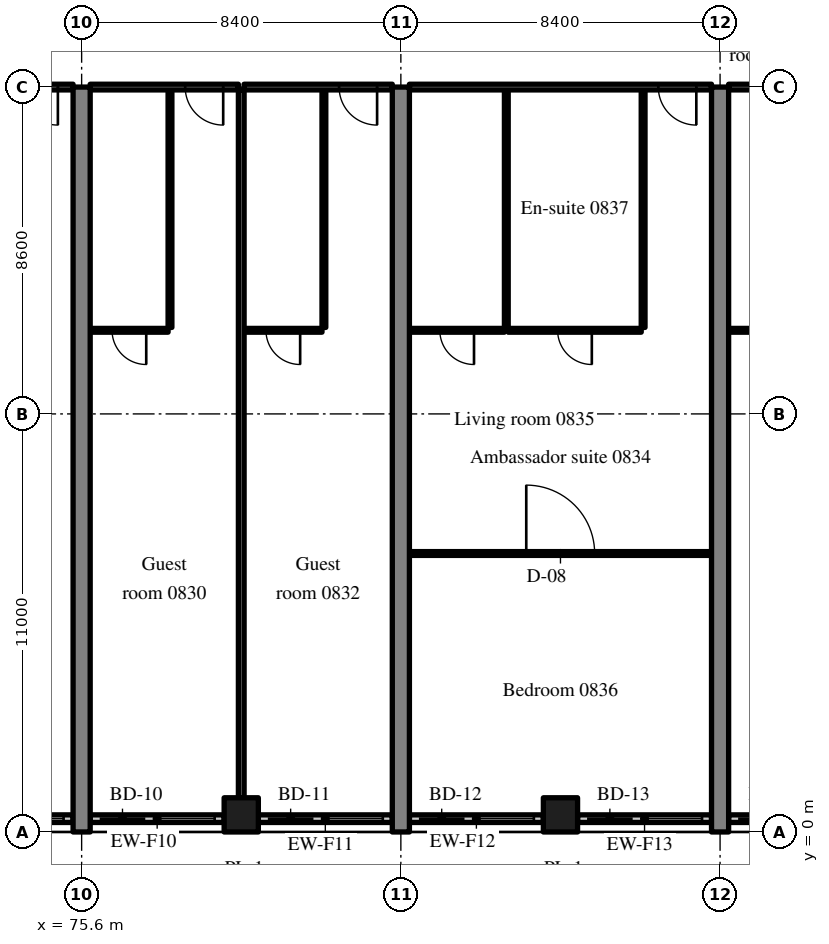
"""IFC4 building model, lengths in metres.
Left out: names, types, materials, properties, quantities, classifications, styles, units other than length and angle.
Written with IfcOpenShell. Run it as: python <this file> out.ifc"""

import sys

from ifc_helpers import new_model, si_unit, direction, frame, frame_2d, origin, origin_2d, place, context, subcontext, project, spatial, rectangle, extrude, source, transform, mapped, element, fill, save


model = new_model("IFC4")
c1 = context("Model", 3, precision=1e-05, world=origin(), true_north=direction((0.0, 1.0)))
c2 = subcontext(c1, "Body", "Model", "MODEL_VIEW")
j1 = project(units=[si_unit("LENGTHUNIT", "METRE"), si_unit("PLANEANGLEUNIT", "RADIAN")], contexts=[c1])
p1 = place(None, origin())
s1 = spatial("IfcSite", under=j1, at=p1, CompositionType="ELEMENT")
p2 = place(p1, origin())
s2 = spatial("IfcBuilding", under=s1, at=p2, CompositionType="ELEMENT")
p3 = place(p2, frame((0.0, 0.0, 39.2)))
s3 = spatial("IfcBuildingStorey", under=s2, at=p3, CompositionType="ELEMENT", Elevation=39.2)
m1 = source(origin(), c2, "Body", "SweptSolid", [
    extrude(rectangle(XDim=19.6, YDim=0.45, at=frame_2d((9.8, 0.0))), origin(), (0.0, 0.0, 1.0), 3.52),
])
for number, where, z_axis, x_axis in (
    (1, (75.6, 0.0, 0.0), (0.0, 0.0, 1.0), (0.0, 1.0, 0.0)),
    (2, (84.0, 0.0, 0.0), (0.0, 0.0, 1.0), (0.0, 1.0, 0.0)),
    (3, (92.4, 0.0, 0.0), (0.0, 0.0, 1.0), (0.0, 1.0, 0.0)),
):
    element("IfcWall", number, at=place(p3, frame(where, z_axis=z_axis, x_axis=x_axis)), inside=s3, PredefinedType="SHEAR", context=c2, shape_type="MappedRepresentation", body=[
        mapped(m1, transform((0.0, 0.0, 0.0), scale=1.0)),
    ])
m2 = source(origin(), c2, "Body", "SweptSolid", [
    extrude(rectangle(XDim=0.9, YDim=0.9, at=origin_2d()), origin(), (0.0, 0.0, 1.0), 3.52),
])
for number, where, z_axis, x_axis in (
    (4, (79.8, 0.45, 0.0), (0.0, 0.0, 1.0), (1.0, 0.0, 0.0)),
    (5, (88.2, 0.45, 0.0), (0.0, 0.0, 1.0), (1.0, 0.0, 0.0)),
):
    element("IfcColumn", number, at=place(p3, frame(where, z_axis=z_axis, x_axis=x_axis)), inside=s3, PredefinedType="COLUMN", context=c2, shape_type="MappedRepresentation", body=[
        mapped(m2, transform((0.0, 0.0, 0.0), scale=1.0)),
    ])
m3 = source(origin(), c2, "Body", "SweptSolid", [
    extrude(rectangle(XDim=3.525, YDim=0.2, at=frame_2d((1.762, 0.0))), origin(), (0.0, 0.0, 1.0), 2.77),
])
p4 = place(p3, frame((71.85, 0.35, 0.0), z_axis=(0.0, 0.0, 1.0), x_axis=(1.0, 0.0, 0.0)))
e6 = element("IfcWall", 6, at=p4, inside=s3, PredefinedType="SOLIDWALL", context=c2, shape_type="MappedRepresentation", body=[
    mapped(m3, transform((0.0, 0.0, 0.0), scale=1.0)),
])
m4 = source(origin(), c2, "Body", "SweptSolid", [
    extrude(rectangle(XDim=1.2, YDim=2.4, at=frame_2d((0.6, 1.2))), frame((0.0, 0.11, 0.0), z_axis=(0.0, -1.0, 0.0), x_axis=(1.0, 0.0, 0.0)), (0.0, 0.0, 1.0), 0.22),
])
p5 = place(p4, frame((0.25, 0.0, 0.0)))
e7 = element("IfcOpeningElement", 7, at=p5, cuts=e6, PredefinedType="OPENING", context=c2, shape_type="MappedRepresentation", body=[
    mapped(m4, transform((0.0, 0.0, 0.0), scale=1.0)),
])
m5 = source(origin(), c2, "Body", "SweptSolid", [
    extrude(rectangle(XDim=1.5, YDim=1.5, at=frame_2d((0.75, 0.75))), frame((0.0, 0.11, 0.0), z_axis=(0.0, -1.0, 0.0), x_axis=(1.0, 0.0, 0.0)), (0.0, 0.0, 1.0), 0.22),
])
p6 = place(p4, frame((1.775, 0.0, 0.9)))
e8 = element("IfcOpeningElement", 8, at=p6, cuts=e6, PredefinedType="OPENING", context=c2, shape_type="MappedRepresentation", body=[
    mapped(m5, transform((0.0, 0.0, 0.0), scale=1.0)),
])
m6 = source(origin(), c2, "Body", "SweptSolid", [
    extrude(rectangle(XDim=3.525, YDim=0.2, at=frame_2d((1.763, 0.0))), origin(), (0.0, 0.0, 1.0), 2.77),
])
p7 = place(p3, frame((75.825, 0.35, 0.0), z_axis=(0.0, 0.0, 1.0), x_axis=(1.0, 0.0, 0.0)))
e9 = element("IfcWall", 9, at=p7, inside=s3, PredefinedType="SOLIDWALL", context=c2, shape_type="MappedRepresentation", body=[
    mapped(m6, transform((0.0, 0.0, 0.0), scale=1.0)),
])
p8 = place(p7, frame((0.25, 0.0, 0.0)))
e10 = element("IfcOpeningElement", 10, at=p8, cuts=e9, PredefinedType="OPENING", context=c2, shape_type="MappedRepresentation", body=[
    mapped(m4, transform((0.0, 0.0, 0.0), scale=1.0)),
])
p9 = place(p7, frame((1.775, 0.0, 0.9)))
e11 = element("IfcOpeningElement", 11, at=p9, cuts=e9, PredefinedType="OPENING", context=c2, shape_type="MappedRepresentation", body=[
    mapped(m5, transform((0.0, 0.0, 0.0), scale=1.0)),
])
p10 = place(p3, frame((80.25, 0.35, 0.0), z_axis=(0.0, 0.0, 1.0), x_axis=(1.0, 0.0, 0.0)))
e12 = element("IfcWall", 12, at=p10, inside=s3, PredefinedType="SOLIDWALL", context=c2, shape_type="MappedRepresentation", body=[
    mapped(m3, transform((0.0, 0.0, 0.0), scale=1.0)),
])
p11 = place(p10, frame((0.25, 0.0, 0.0)))
e13 = element("IfcOpeningElement", 13, at=p11, cuts=e12, PredefinedType="OPENING", context=c2, shape_type="MappedRepresentation", body=[
    mapped(m4, transform((0.0, 0.0, 0.0), scale=1.0)),
])
p12 = place(p10, frame((1.775, 0.0, 0.9)))
e14 = element("IfcOpeningElement", 14, at=p12, cuts=e12, PredefinedType="OPENING", context=c2, shape_type="MappedRepresentation", body=[
    mapped(m5, transform((0.0, 0.0, 0.0), scale=1.0)),
])
p13 = place(p3, frame((84.225, 0.35, 0.0), z_axis=(0.0, 0.0, 1.0), x_axis=(1.0, 0.0, 0.0)))
e15 = element("IfcWall", 15, at=p13, inside=s3, PredefinedType="SOLIDWALL", context=c2, shape_type="MappedRepresentation", body=[
    mapped(m3, transform((0.0, 0.0, 0.0), scale=1.0)),
])
p14 = place(p13, frame((0.25, 0.0, 0.0)))
e16 = element("IfcOpeningElement", 16, at=p14, cuts=e15, PredefinedType="OPENING", context=c2, shape_type="MappedRepresentation", body=[
    mapped(m4, transform((0.0, 0.0, 0.0), scale=1.0)),
])
p15 = place(p13, frame((1.775, 0.0, 0.9)))
e17 = element("IfcOpeningElement", 17, at=p15, cuts=e15, PredefinedType="OPENING", context=c2, shape_type="MappedRepresentation", body=[
    mapped(m5, transform((0.0, 0.0, 0.0), scale=1.0)),
])
p16 = place(p3, frame((88.65, 0.35, 0.0), z_axis=(0.0, 0.0, 1.0), x_axis=(1.0, 0.0, 0.0)))
e18 = element("IfcWall", 18, at=p16, inside=s3, PredefinedType="SOLIDWALL", context=c2, shape_type="MappedRepresentation", body=[
    mapped(m6, transform((0.0, 0.0, 0.0), scale=1.0)),
])
p17 = place(p16, frame((0.25, 0.0, 0.0)))
e19 = element("IfcOpeningElement", 19, at=p17, cuts=e18, PredefinedType="OPENING", context=c2, shape_type="MappedRepresentation", body=[
    mapped(m4, transform((0.0, 0.0, 0.0), scale=1.0)),
])
p18 = place(p16, frame((1.775, 0.0, 0.9)))
e20 = element("IfcOpeningElement", 20, at=p18, cuts=e18, PredefinedType="OPENING", context=c2, shape_type="MappedRepresentation", body=[
    mapped(m5, transform((0.0, 0.0, 0.0), scale=1.0)),
])
m7 = source(origin(), c2, "Body", "SweptSolid", [
    extrude(rectangle(XDim=4.03, YDim=0.2, at=frame_2d((2.015, 0.0))), origin(), (0.0, 0.0, 1.0), 2.77),
])
p19 = place(p3, frame((92.625, 0.35, 0.0), z_axis=(0.0, 0.0, 1.0), x_axis=(1.0, 0.0, 0.0)))
e21 = element("IfcWall", 21, at=p19, inside=s3, PredefinedType="SOLIDWALL", context=c2, shape_type="MappedRepresentation", body=[
    mapped(m7, transform((0.0, 0.0, 0.0), scale=1.0)),
])
p20 = place(p19, frame((0.25, 0.0, 0.0)))
e22 = element("IfcOpeningElement", 22, at=p20, cuts=e21, PredefinedType="OPENING", context=c2, shape_type="MappedRepresentation", body=[
    mapped(m4, transform((0.0, 0.0, 0.0), scale=1.0)),
])
p21 = place(p19, frame((2.28, 0.0, 0.9)))
e23 = element("IfcOpeningElement", 23, at=p21, cuts=e21, PredefinedType="OPENING", context=c2, shape_type="MappedRepresentation", body=[
    mapped(m5, transform((0.0, 0.0, 0.0), scale=1.0)),
])
m8 = source(origin(), c2, "Body", "SweptSolid", [
    extrude(rectangle(XDim=7.95, YDim=0.15, at=frame_2d((3.975, 0.0))), origin(), (0.0, 0.0, 1.0), 2.82),
])
p22 = place(p3, frame((67.425, 19.6, 0.0), z_axis=(0.0, 0.0, 1.0), x_axis=(1.0, 0.0, 0.0)))
e24 = element("IfcWall", 24, at=p22, inside=s3, PredefinedType="PARTITIONING", context=c2, shape_type="MappedRepresentation", body=[
    mapped(m8, transform((0.0, 0.0, 0.0), scale=1.0)),
])
m9 = source(origin(), c2, "Body", "SweptSolid", [
    extrude(rectangle(XDim=1.0, YDim=2.1, at=frame_2d((0.5, 1.05))), frame((0.0, 0.085, 0.0), z_axis=(0.0, -1.0, 0.0), x_axis=(1.0, 0.0, 0.0)), (0.0, 0.0, 1.0), 0.17),
])
p23 = place(p22, frame((6.55, 0.0, 0.0)))
e25 = element("IfcOpeningElement", 25, at=p23, cuts=e24, PredefinedType="OPENING", context=c2, shape_type="MappedRepresentation", body=[
    mapped(m9, transform((0.0, 0.0, 0.0), scale=1.0)),
])
m10 = source(origin(), c2, "Body", "SweptSolid", [
    extrude(rectangle(XDim=6.25, YDim=0.1, at=frame_2d((3.125, 0.0))), origin(), (0.0, 0.0, 1.0), 3.52),
])
p24 = place(p3, frame((77.925, 13.275, 0.0), z_axis=(0.0, 0.0, 1.0), x_axis=(0.0, 1.0, 0.0)))
e26 = element("IfcWall", 26, at=p24, inside=s3, PredefinedType="PARTITIONING", context=c2, shape_type="MappedRepresentation", body=[
    mapped(m10, transform((0.0, 0.0, 0.0), scale=1.0)),
])
m11 = source(origin(), c2, "Body", "SweptSolid", [
    extrude(rectangle(XDim=2.05, YDim=0.1, at=frame_2d((1.025, 0.0))), origin(), (0.0, 0.0, 1.0), 3.52),
])
p25 = place(p3, frame((75.825, 13.2, 0.0), z_axis=(0.0, 0.0, 1.0), x_axis=(1.0, 0.0, 0.0)))
e27 = element("IfcWall", 27, at=p25, inside=s3, PredefinedType="PARTITIONING", context=c2, shape_type="MappedRepresentation", body=[
    mapped(m11, transform((0.0, 0.0, 0.0), scale=1.0)),
])
m12 = source(origin(), c2, "Body", "SweptSolid", [
    extrude(rectangle(XDim=0.9, YDim=2.1, at=frame_2d((0.45, 1.05))), frame((0.0, 0.06, 0.0), z_axis=(0.0, -1.0, 0.0), x_axis=(1.0, 0.0, 0.0)), (0.0, 0.0, 1.0), 0.12),
])
p26 = place(p25, frame((0.575, 0.0, 0.0)))
e28 = element("IfcOpeningElement", 28, at=p26, cuts=e27, PredefinedType="OPENING", context=c2, shape_type="MappedRepresentation", body=[
    mapped(m12, transform((0.0, 0.0, 0.0), scale=1.0)),
])
m13 = source(origin(), c2, "Body", "SweptSolid", [
    extrude(rectangle(XDim=3.9, YDim=0.15, at=frame_2d((1.95, 0.0))), origin(), (0.0, 0.0, 1.0), 2.82),
])
p27 = place(p3, frame((75.825, 19.6, 0.0), z_axis=(0.0, 0.0, 1.0), x_axis=(1.0, 0.0, 0.0)))
e29 = element("IfcWall", 29, at=p27, inside=s3, PredefinedType="PARTITIONING", context=c2, shape_type="MappedRepresentation", body=[
    mapped(m13, transform((0.0, 0.0, 0.0), scale=1.0)),
])
p28 = place(p27, frame((2.5, 0.0, 0.0)))
e30 = element("IfcOpeningElement", 30, at=p28, cuts=e29, PredefinedType="OPENING", context=c2, shape_type="MappedRepresentation", body=[
    mapped(m9, transform((0.0, 0.0, 0.0), scale=1.0)),
])
p29 = place(p3, frame((81.975, 13.275, 0.0), z_axis=(0.0, 0.0, 1.0), x_axis=(0.0, 1.0, 0.0)))
e31 = element("IfcWall", 31, at=p29, inside=s3, PredefinedType="PARTITIONING", context=c2, shape_type="MappedRepresentation", body=[
    mapped(m10, transform((0.0, 0.0, 0.0), scale=1.0)),
])
p30 = place(p3, frame((79.875, 13.2, 0.0), z_axis=(0.0, 0.0, 1.0), x_axis=(1.0, 0.0, 0.0)))
e32 = element("IfcWall", 32, at=p30, inside=s3, PredefinedType="PARTITIONING", context=c2, shape_type="MappedRepresentation", body=[
    mapped(m11, transform((0.0, 0.0, 0.0), scale=1.0)),
])
p31 = place(p30, frame((0.575, 0.0, 0.0)))
e33 = element("IfcOpeningElement", 33, at=p31, cuts=e32, PredefinedType="OPENING", context=c2, shape_type="MappedRepresentation", body=[
    mapped(m12, transform((0.0, 0.0, 0.0), scale=1.0)),
])
m14 = source(origin(), c2, "Body", "SweptSolid", [
    extrude(rectangle(XDim=3.9, YDim=0.15, at=frame_2d((1.95, 0.0))), origin(), (0.0, 0.0, 1.0), 2.82),
])
p32 = place(p3, frame((79.875, 19.6, 0.0), z_axis=(0.0, 0.0, 1.0), x_axis=(1.0, 0.0, 0.0)))
e34 = element("IfcWall", 34, at=p32, inside=s3, PredefinedType="PARTITIONING", context=c2, shape_type="MappedRepresentation", body=[
    mapped(m14, transform((0.0, 0.0, 0.0), scale=1.0)),
])
p33 = place(p32, frame((2.5, 0.0, 0.0)))
e35 = element("IfcOpeningElement", 35, at=p33, cuts=e34, PredefinedType="OPENING", context=c2, shape_type="MappedRepresentation", body=[
    mapped(m9, transform((0.0, 0.0, 0.0), scale=1.0)),
])
m15 = source(origin(), c2, "Body", "SweptSolid", [
    extrude(rectangle(XDim=18.625, YDim=0.15, at=frame_2d((9.312, 0.0))), origin(), (0.0, 0.0, 1.0), 3.52),
])
p34 = place(p3, frame((79.8, 0.9, 0.0), z_axis=(0.0, 0.0, 1.0), x_axis=(0.0, 1.0, 0.0)))
e36 = element("IfcWall", 36, at=p34, inside=s3, PredefinedType="PARTITIONING", context=c2, shape_type="MappedRepresentation", body=[
    mapped(m15, transform((0.0, 0.0, 0.0), scale=1.0)),
])
for number, where, z_axis, x_axis in (
    (37, (90.375, 13.275, 0.0), (0.0, 0.0, 1.0), (0.0, 1.0, 0.0)),
    (38, (86.775, 13.275, 0.0), (0.0, 0.0, 1.0), (0.0, 1.0, 0.0)),
):
    element("IfcWall", number, at=place(p3, frame(where, z_axis=z_axis, x_axis=x_axis)), inside=s3, PredefinedType="PARTITIONING", context=c2, shape_type="MappedRepresentation", body=[
        mapped(m10, transform((0.0, 0.0, 0.0), scale=1.0)),
    ])
m16 = source(origin(), c2, "Body", "SweptSolid", [
    extrude(rectangle(XDim=3.5, YDim=0.1, at=frame_2d((1.75, 0.0))), origin(), (0.0, 0.0, 1.0), 3.52),
])
p35 = place(p3, frame((86.825, 13.2, 0.0), z_axis=(0.0, 0.0, 1.0), x_axis=(1.0, 0.0, 0.0)))
e39 = element("IfcWall", 39, at=p35, inside=s3, PredefinedType="PARTITIONING", context=c2, shape_type="MappedRepresentation", body=[
    mapped(m16, transform((0.0, 0.0, 0.0), scale=1.0)),
])
p36 = place(p35, frame((1.3, 0.0, 0.0)))
e40 = element("IfcOpeningElement", 40, at=p36, cuts=e39, PredefinedType="OPENING", context=c2, shape_type="MappedRepresentation", body=[
    mapped(m12, transform((0.0, 0.0, 0.0), scale=1.0)),
])
m17 = source(origin(), c2, "Body", "SweptSolid", [
    extrude(rectangle(XDim=2.5, YDim=0.1, at=frame_2d((1.25, 0.0))), origin(), (0.0, 0.0, 1.0), 3.52),
])
p37 = place(p3, frame((84.225, 13.2, 0.0), z_axis=(0.0, 0.0, 1.0), x_axis=(1.0, 0.0, 0.0)))
e41 = element("IfcWall", 41, at=p37, inside=s3, PredefinedType="PARTITIONING", context=c2, shape_type="MappedRepresentation", body=[
    mapped(m17, transform((0.0, 0.0, 0.0), scale=1.0)),
])
p38 = place(p37, frame((0.8, 0.0, 0.0)))
e42 = element("IfcOpeningElement", 42, at=p38, cuts=e41, PredefinedType="OPENING", context=c2, shape_type="MappedRepresentation", body=[
    mapped(m12, transform((0.0, 0.0, 0.0), scale=1.0)),
])
m18 = source(origin(), c2, "Body", "SweptSolid", [
    extrude(rectangle(XDim=7.95, YDim=0.1, at=frame_2d((3.975, 0.0))), origin(), (0.0, 0.0, 1.0), 3.52),
])
p39 = place(p3, frame((84.225, 7.327, 0.0), z_axis=(0.0, 0.0, 1.0), x_axis=(1.0, 0.0, 0.0)))
e43 = element("IfcWall", 43, at=p39, inside=s3, PredefinedType="PARTITIONING", context=c2, shape_type="MappedRepresentation", body=[
    mapped(m18, transform((0.0, 0.0, 0.0), scale=1.0)),
])
m19 = source(origin(), c2, "Body", "SweptSolid", [
    extrude(rectangle(XDim=1.8, YDim=2.1, at=frame_2d((0.9, 1.05))), frame((0.0, 0.06, 0.0), z_axis=(0.0, -1.0, 0.0), x_axis=(1.0, 0.0, 0.0)), (0.0, 0.0, 1.0), 0.12),
])
p40 = place(p39, frame((3.075, 0.0, 0.0)))
e44 = element("IfcOpeningElement", 44, at=p40, cuts=e43, PredefinedType="OPENING", context=c2, shape_type="MappedRepresentation", body=[
    mapped(m19, transform((0.0, 0.0, 0.0), scale=1.0)),
])
p41 = place(p3, frame((84.225, 19.6, 0.0), z_axis=(0.0, 0.0, 1.0), x_axis=(1.0, 0.0, 0.0)))
e45 = element("IfcWall", 45, at=p41, inside=s3, PredefinedType="PARTITIONING", context=c2, shape_type="MappedRepresentation", body=[
    mapped(m8, transform((0.0, 0.0, 0.0), scale=1.0)),
])
p42 = place(p41, frame((6.55, 0.0, 0.0)))
e46 = element("IfcOpeningElement", 46, at=p42, cuts=e45, PredefinedType="OPENING", context=c2, shape_type="MappedRepresentation", body=[
    mapped(m9, transform((0.0, 0.0, 0.0), scale=1.0)),
])
m20 = source(origin(), c2, "Body", "SweptSolid", [
    extrude(rectangle(XDim=2.275, YDim=0.1, at=frame_2d((1.137, 0.0))), origin(), (0.0, 0.0, 1.0), 3.52),
])
p43 = place(p3, frame((92.625, 13.2, 0.0), z_axis=(0.0, 0.0, 1.0), x_axis=(1.0, 0.0, 0.0)))
e47 = element("IfcWall", 47, at=p43, inside=s3, PredefinedType="PARTITIONING", context=c2, shape_type="MappedRepresentation", body=[
    mapped(m20, transform((0.0, 0.0, 0.0), scale=1.0)),
])
p44 = place(p43, frame((0.688, 0.0, 0.0)))
e48 = element("IfcOpeningElement", 48, at=p44, cuts=e47, PredefinedType="OPENING", context=c2, shape_type="MappedRepresentation", body=[
    mapped(m12, transform((0.0, 0.0, 0.0), scale=1.0)),
])
m21 = source(origin(), c2, "Body", "SweptSolid", [
    extrude(rectangle(XDim=7.725, YDim=0.15, at=frame_2d((3.863, 0.0))), origin(), (0.0, 0.0, 1.0), 2.82),
])
p45 = place(p3, frame((92.625, 19.6, 0.0), z_axis=(0.0, 0.0, 1.0), x_axis=(1.0, 0.0, 0.0)))
e49 = element("IfcWall", 49, at=p45, inside=s3, PredefinedType="PARTITIONING", context=c2, shape_type="MappedRepresentation", body=[
    mapped(m21, transform((0.0, 0.0, 0.0), scale=1.0)),
])
p46 = place(p45, frame((6.325, 0.0, 0.0)))
e50 = element("IfcOpeningElement", 50, at=p46, cuts=e49, PredefinedType="OPENING", context=c2, shape_type="MappedRepresentation", body=[
    mapped(m9, transform((0.0, 0.0, 0.0), scale=1.0)),
])
m22 = source(origin(), c2, "Body", "SweptSolid", [
    extrude(rectangle(XDim=1.5, YDim=1.5, at=frame_2d((0.75, 0.75))), frame((0.0, 0.03, 0.0), z_axis=(0.0, -1.0, 0.0), x_axis=(1.0, 0.0, 0.0)), (0.0, 0.0, 1.0), 0.06),
])
p47 = place(p6, origin())
e51 = element("IfcWindow", 51, at=p47, inside=s3, PartitioningType="SINGLE_PANEL", PredefinedType="WINDOW", context=c2, shape_type="MappedRepresentation", body=[
    mapped(m22, transform((0.0, 0.0, 0.0), scale=1.0)),
])
fill(e8, e51)
m23 = source(origin(), c2, "Body", "SweptSolid", [
    extrude(rectangle(XDim=1.2, YDim=2.4, at=frame_2d((0.6, 1.2))), frame((0.0, 0.025, 0.0), z_axis=(0.0, -1.0, 0.0), x_axis=(1.0, 0.0, 0.0)), (0.0, 0.0, 1.0), 0.05),
])
p48 = place(p8, origin())
e52 = element("IfcDoor", 52, at=p48, inside=s3, OperationType="SLIDING_TO_RIGHT", PredefinedType="DOOR", context=c2, shape_type="MappedRepresentation", body=[
    mapped(m23, transform((0.0, 0.0, 0.0), scale=1.0)),
])
fill(e10, e52)
p49 = place(p9, origin())
e53 = element("IfcWindow", 53, at=p49, inside=s3, PartitioningType="SINGLE_PANEL", PredefinedType="WINDOW", context=c2, shape_type="MappedRepresentation", body=[
    mapped(m22, transform((0.0, 0.0, 0.0), scale=1.0)),
])
fill(e11, e53)
p50 = place(p11, origin())
e54 = element("IfcDoor", 54, at=p50, inside=s3, OperationType="SLIDING_TO_LEFT", PredefinedType="DOOR", context=c2, shape_type="MappedRepresentation", body=[
    mapped(m23, transform((0.0, 0.0, 0.0), scale=1.0)),
])
fill(e13, e54)
p51 = place(p12, origin())
e55 = element("IfcWindow", 55, at=p51, inside=s3, PartitioningType="SINGLE_PANEL", PredefinedType="WINDOW", context=c2, shape_type="MappedRepresentation", body=[
    mapped(m22, transform((0.0, 0.0, 0.0), scale=1.0)),
])
fill(e14, e55)
p52 = place(p14, origin())
e56 = element("IfcDoor", 56, at=p52, inside=s3, OperationType="SLIDING_TO_RIGHT", PredefinedType="DOOR", context=c2, shape_type="MappedRepresentation", body=[
    mapped(m23, transform((0.0, 0.0, 0.0), scale=1.0)),
])
fill(e16, e56)
p53 = place(p15, origin())
e57 = element("IfcWindow", 57, at=p53, inside=s3, PartitioningType="SINGLE_PANEL", PredefinedType="WINDOW", context=c2, shape_type="MappedRepresentation", body=[
    mapped(m22, transform((0.0, 0.0, 0.0), scale=1.0)),
])
fill(e17, e57)
p54 = place(p17, origin())
e58 = element("IfcDoor", 58, at=p54, inside=s3, OperationType="SLIDING_TO_LEFT", PredefinedType="DOOR", context=c2, shape_type="MappedRepresentation", body=[
    mapped(m23, transform((0.0, 0.0, 0.0), scale=1.0)),
])
fill(e19, e58)
p55 = place(p18, origin())
e59 = element("IfcWindow", 59, at=p55, inside=s3, PartitioningType="SINGLE_PANEL", PredefinedType="WINDOW", context=c2, shape_type="MappedRepresentation", body=[
    mapped(m22, transform((0.0, 0.0, 0.0), scale=1.0)),
])
fill(e20, e59)
p56 = place(p20, origin())
e60 = element("IfcDoor", 60, at=p56, inside=s3, OperationType="SLIDING_TO_RIGHT", PredefinedType="DOOR", context=c2, shape_type="MappedRepresentation", body=[
    mapped(m23, transform((0.0, 0.0, 0.0), scale=1.0)),
])
fill(e22, e60)
m24 = source(origin(), c2, "Body", "SweptSolid", [
    extrude(rectangle(XDim=1.0, YDim=2.1, at=frame_2d((0.5, 1.05))), frame((0.0, 0.025, 0.0), z_axis=(0.0, -1.0, 0.0), x_axis=(1.0, 0.0, 0.0)), (0.0, 0.0, 1.0), 0.05),
])
p57 = place(p23, origin())
e61 = element("IfcDoor", 61, at=p57, inside=s3, OperationType="SINGLE_SWING_RIGHT", PredefinedType="DOOR", context=c2, shape_type="MappedRepresentation", body=[
    mapped(m24, transform((0.0, 0.0, 0.0), scale=1.0)),
])
fill(e25, e61)
m25 = source(origin(), c2, "Body", "SweptSolid", [
    extrude(rectangle(XDim=0.9, YDim=2.1, at=frame_2d((0.45, 1.05))), frame((0.0, 0.025, 0.0), z_axis=(0.0, -1.0, 0.0), x_axis=(1.0, 0.0, 0.0)), (0.0, 0.0, 1.0), 0.05),
])
p58 = place(p26, origin())
e62 = element("IfcDoor", 62, at=p58, inside=s3, OperationType="SINGLE_SWING_RIGHT", PredefinedType="DOOR", context=c2, shape_type="MappedRepresentation", body=[
    mapped(m25, transform((0.0, 0.0, 0.0), scale=1.0)),
])
fill(e28, e62)
p59 = place(p28, origin())
e63 = element("IfcDoor", 63, at=p59, inside=s3, OperationType="SINGLE_SWING_RIGHT", PredefinedType="DOOR", context=c2, shape_type="MappedRepresentation", body=[
    mapped(m24, transform((0.0, 0.0, 0.0), scale=1.0)),
])
fill(e30, e63)
p60 = place(p31, origin())
e64 = element("IfcDoor", 64, at=p60, inside=s3, OperationType="SINGLE_SWING_RIGHT", PredefinedType="DOOR", context=c2, shape_type="MappedRepresentation", body=[
    mapped(m25, transform((0.0, 0.0, 0.0), scale=1.0)),
])
fill(e33, e64)
p61 = place(p33, origin())
e65 = element("IfcDoor", 65, at=p61, inside=s3, OperationType="SINGLE_SWING_RIGHT", PredefinedType="DOOR", context=c2, shape_type="MappedRepresentation", body=[
    mapped(m24, transform((0.0, 0.0, 0.0), scale=1.0)),
])
fill(e35, e65)
p62 = place(p36, origin())
e66 = element("IfcDoor", 66, at=p62, inside=s3, OperationType="SINGLE_SWING_RIGHT", PredefinedType="DOOR", context=c2, shape_type="MappedRepresentation", body=[
    mapped(m25, transform((0.0, 0.0, 0.0), scale=1.0)),
])
fill(e40, e66)
p63 = place(p38, origin())
e67 = element("IfcDoor", 67, at=p63, inside=s3, OperationType="SINGLE_SWING_RIGHT", PredefinedType="DOOR", context=c2, shape_type="MappedRepresentation", body=[
    mapped(m25, transform((0.0, 0.0, 0.0), scale=1.0)),
])
fill(e42, e67)
m26 = source(origin(), c2, "Body", "SweptSolid", [
    extrude(rectangle(XDim=1.8, YDim=2.1, at=frame_2d((0.9, 1.05))), frame((0.0, 0.025, 0.0), z_axis=(0.0, -1.0, 0.0), x_axis=(1.0, 0.0, 0.0)), (0.0, 0.0, 1.0), 0.05),
])
p64 = place(p40, origin())
e68 = element("IfcDoor", 68, at=p64, inside=s3, OperationType="DOUBLE_DOOR_SINGLE_SWING", PredefinedType="DOOR", context=c2, shape_type="MappedRepresentation", body=[
    mapped(m26, transform((0.0, 0.0, 0.0), scale=1.0)),
])
fill(e44, e68)
p65 = place(p42, origin())
e69 = element("IfcDoor", 69, at=p65, inside=s3, OperationType="SINGLE_SWING_RIGHT", PredefinedType="DOOR", context=c2, shape_type="MappedRepresentation", body=[
    mapped(m24, transform((0.0, 0.0, 0.0), scale=1.0)),
])
fill(e46, e69)
save(model, sys.argv[1])
